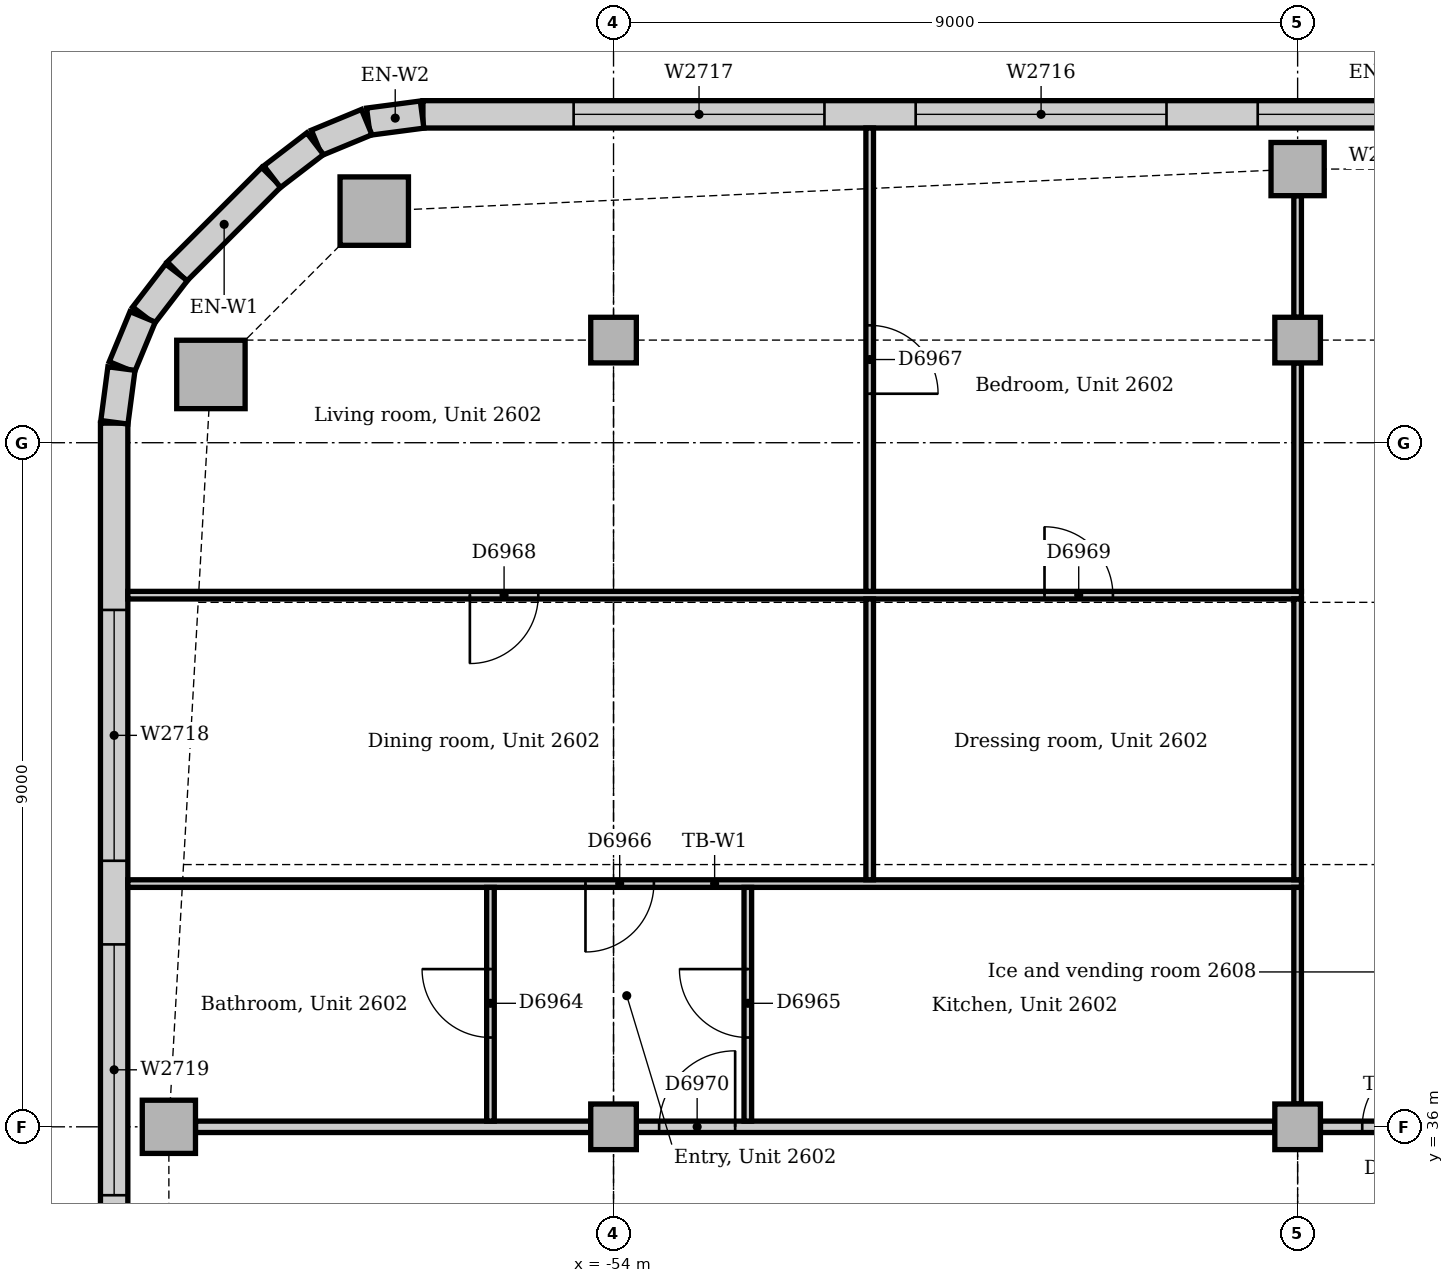
"""IFC4 building model, lengths in metres.
Left out: names, types, materials, properties, quantities, classifications, styles, units other than length and angle.
Written with IfcOpenShell. Run it as: python <this file> out.ifc"""

import sys

from ifc_helpers import new_model, si_unit, direction, frame, frame_2d, origin, origin_2d, place, context, subcontext, project, spatial, rectangle, extrude, element, fill, save


model = new_model("IFC4")
c1 = context("Model", 3, precision=1e-05, world=origin(), true_north=direction((0.0, 1.0)))
c2 = subcontext(c1, "Body", "Model", "MODEL_VIEW")
j1 = project(units=[si_unit("LENGTHUNIT", "METRE"), si_unit("PLANEANGLEUNIT", "RADIAN")], contexts=[c1])
p1 = place(None, origin())
s1 = spatial("IfcSite", under=j1, at=p1, CompositionType="ELEMENT")
p2 = place(p1, origin())
s2 = spatial("IfcBuilding", under=s1, at=p2, CompositionType="ELEMENT")
p3 = place(p2, frame((0.0, 0.0, 112.0)))
s3 = spatial("IfcBuildingStorey", under=s2, at=p3, CompositionType="ELEMENT", Elevation=112.0)
for number, where, z_axis, x_axis in (
    (1, (-57.148, 48.047, 0.0), (0.0, 0.0, 1.0), (1.0, 0.0, 0.0)),
    (2, (-59.297, 45.898, 0.0), (0.0, 0.0, 1.0), (1.0, 0.0, 0.0)),
):
    element("IfcColumn", number, at=place(p3, frame(where, z_axis=z_axis, x_axis=x_axis)), inside=s3, PredefinedType="COLUMN", context=c2, shape_type="SweptSolid", body=[
        extrude(rectangle(XDim=0.9, YDim=0.9, at=origin_2d()), origin(), (0.0, 0.0, 1.0), 3.85),
    ])
for number, where, z_axis, x_axis in (
    (3, (-45.0, 48.6, 0.0), (0.0, 0.0, 1.0), (1.0, 0.0, 0.0)),
    (4, (-59.85, 36.0, 0.0), (0.0, 0.0, 1.0), (1.0, 0.0, 0.0)),
):
    element("IfcColumn", number, at=place(p3, frame(where, z_axis=z_axis, x_axis=x_axis)), inside=s3, PredefinedType="COLUMN", context=c2, shape_type="SweptSolid", body=[
        extrude(rectangle(XDim=0.7, YDim=0.7, at=origin_2d()), origin(), (0.0, 0.0, 1.0), 3.85),
    ])
for number, where, z_axis, x_axis in (
    (5, (-54.0, 36.0, 0.0), (0.0, 0.0, 1.0), (1.0, 0.0, 0.0)),
    (6, (-54.0, 46.35, 0.0), (0.0, 0.0, 1.0), (1.0, 0.0, 0.0)),
    (7, (-45.0, 36.0, 0.0), (0.0, 0.0, 1.0), (1.0, 0.0, 0.0)),
    (8, (-45.0, 46.35, 0.0), (0.0, 0.0, 1.0), (1.0, 0.0, 0.0)),
):
    element("IfcColumn", number, at=place(p3, frame(where, z_axis=z_axis, x_axis=x_axis)), inside=s3, PredefinedType="COLUMN", context=c2, shape_type="SweptSolid", body=[
        extrude(rectangle(XDim=0.6, YDim=0.6, at=origin_2d()), origin(), (0.0, 0.0, 1.0), 3.85),
    ])
p4 = place(p3, frame((-31.243, 49.32, 0.0), z_axis=(0.0, 0.0, 1.0), x_axis=(-1.0, 0.0, 0.0)))
e9 = element("IfcWall", 9, at=p4, inside=s3, PredefinedType="STANDARD", context=c2, shape_type="SweptSolid", body=[
    extrude(rectangle(XDim=25.265, YDim=0.36, at=frame_2d((12.632, 0.0))), origin(), (0.0, 0.0, 1.0), 3.85),
])
p5 = place(p4, frame((1.982, 0.0, 0.9)))
e10 = element("IfcOpeningElement", 10, at=p5, cuts=e9, PredefinedType="OPENING", context=c2, shape_type="SweptSolid", body=[
    extrude(rectangle(XDim=3.3, YDim=1.6, at=frame_2d((1.65, 0.8))), frame((0.0, 0.19, 0.0), z_axis=(0.0, -1.0, 0.0), x_axis=(1.0, 0.0, 0.0)), (0.0, 0.0, 1.0), 0.38),
])
p6 = place(p4, frame((6.482, 0.0, 0.9)))
e11 = element("IfcOpeningElement", 11, at=p6, cuts=e9, PredefinedType="OPENING", context=c2, shape_type="SweptSolid", body=[
    extrude(rectangle(XDim=3.3, YDim=1.6, at=frame_2d((1.65, 0.8))), frame((0.0, 0.19, 0.0), z_axis=(0.0, -1.0, 0.0), x_axis=(1.0, 0.0, 0.0)), (0.0, 0.0, 1.0), 0.38),
])
p7 = place(p4, frame((10.982, 0.0, 0.9)))
e12 = element("IfcOpeningElement", 12, at=p7, cuts=e9, PredefinedType="OPENING", context=c2, shape_type="SweptSolid", body=[
    extrude(rectangle(XDim=3.3, YDim=1.6, at=frame_2d((1.65, 0.8))), frame((0.0, 0.19, 0.0), z_axis=(0.0, -1.0, 0.0), x_axis=(1.0, 0.0, 0.0)), (0.0, 0.0, 1.0), 0.38),
])
p8 = place(p4, frame((15.482, 0.0, 0.9)))
e13 = element("IfcOpeningElement", 13, at=p8, cuts=e9, PredefinedType="OPENING", context=c2, shape_type="SweptSolid", body=[
    extrude(rectangle(XDim=3.3, YDim=1.6, at=frame_2d((1.65, 0.8))), frame((0.0, 0.19, 0.0), z_axis=(0.0, -1.0, 0.0), x_axis=(1.0, 0.0, 0.0)), (0.0, 0.0, 1.0), 0.38),
])
p9 = place(p4, frame((19.982, 0.0, 0.9)))
e14 = element("IfcOpeningElement", 14, at=p9, cuts=e9, PredefinedType="OPENING", context=c2, shape_type="SweptSolid", body=[
    extrude(rectangle(XDim=3.3, YDim=1.6, at=frame_2d((1.65, 0.8))), frame((0.0, 0.19, 0.0), z_axis=(0.0, -1.0, 0.0), x_axis=(1.0, 0.0, 0.0)), (0.0, 0.0, 1.0), 0.38),
])
p10 = place(p3, frame((-58.501, 48.494, 0.0), z_axis=(0.0, 0.0, 1.0), x_axis=(-0.707106781187, -0.707106781187, 0.0)))
e15 = element("IfcWall", 15, at=p10, inside=s3, PredefinedType="STANDARD", context=c2, shape_type="SweptSolid", body=[
    extrude(rectangle(XDim=1.757, YDim=0.36, at=frame_2d((0.879, 0.0))), origin(), (0.0, 0.0, 1.0), 3.85),
])
p11 = place(p3, frame((-60.57, 45.257, 0.0), z_axis=(0.0, 0.0, 1.0), x_axis=(0.0, -1.0, 0.0)))
e16 = element("IfcWall", 16, at=p11, inside=s3, PredefinedType="STANDARD", context=c2, shape_type="SweptSolid", body=[
    extrude(rectangle(XDim=21.515, YDim=0.36, at=frame_2d((10.757, 0.0))), origin(), (0.0, 0.0, 1.0), 3.85),
])
p12 = place(p11, frame((2.457, 0.0, 0.9)))
e17 = element("IfcOpeningElement", 17, at=p12, cuts=e16, PredefinedType="OPENING", context=c2, shape_type="SweptSolid", body=[
    extrude(rectangle(XDim=3.3, YDim=1.6, at=frame_2d((1.65, 0.8))), frame((0.0, 0.19, 0.0), z_axis=(0.0, -1.0, 0.0), x_axis=(1.0, 0.0, 0.0)), (0.0, 0.0, 1.0), 0.38),
])
p13 = place(p11, frame((6.857, 0.0, 0.9)))
e18 = element("IfcOpeningElement", 18, at=p13, cuts=e16, PredefinedType="OPENING", context=c2, shape_type="SweptSolid", body=[
    extrude(rectangle(XDim=3.3, YDim=1.6, at=frame_2d((1.65, 0.8))), frame((0.0, 0.19, 0.0), z_axis=(0.0, -1.0, 0.0), x_axis=(1.0, 0.0, 0.0)), (0.0, 0.0, 1.0), 0.38),
])
p14 = place(p11, frame((11.357, 0.0, 0.9)))
e19 = element("IfcOpeningElement", 19, at=p14, cuts=e16, PredefinedType="OPENING", context=c2, shape_type="SweptSolid", body=[
    extrude(rectangle(XDim=3.3, YDim=1.6, at=frame_2d((1.65, 0.8))), frame((0.0, 0.19, 0.0), z_axis=(0.0, -1.0, 0.0), x_axis=(1.0, 0.0, 0.0)), (0.0, 0.0, 1.0), 0.38),
])
p15 = place(p11, frame((15.857, 0.0, 0.9)))
e20 = element("IfcOpeningElement", 20, at=p15, cuts=e16, PredefinedType="OPENING", context=c2, shape_type="SweptSolid", body=[
    extrude(rectangle(XDim=3.3, YDim=1.6, at=frame_2d((1.65, 0.8))), frame((0.0, 0.19, 0.0), z_axis=(0.0, -1.0, 0.0), x_axis=(1.0, 0.0, 0.0)), (0.0, 0.0, 1.0), 0.38),
])
for number, where, z_axis, x_axis in (
    (21, (-56.519, 49.317, 0.0), (0.0, 0.0, 1.0), (-0.991, -0.131, 0.0)),
    (22, (-57.247, 49.218, 0.0), (0.0, 0.0, 1.0), (-0.924, -0.383, 0.0)),
):
    element("IfcWall", number, at=place(p3, frame(where, z_axis=z_axis, x_axis=x_axis)), inside=s3, PredefinedType="STANDARD", context=c2, shape_type="SweptSolid", body=[
        extrude(rectangle(XDim=0.713, YDim=0.36, at=frame_2d((0.356, 0.0))), origin(), (0.0, 0.0, 1.0), 3.85),
    ])
for number, where, z_axis, x_axis in (
    (23, (-57.925, 48.934, 0.0), (0.0, 0.0, 1.0), (-0.793, -0.609, 0.0)),
    (24, (-59.75, 47.241, 0.0), (0.0, 0.0, 1.0), (-0.609, -0.793, 0.0)),
):
    element("IfcWall", number, at=place(p3, frame(where, z_axis=z_axis, x_axis=x_axis)), inside=s3, PredefinedType="STANDARD", context=c2, shape_type="SweptSolid", body=[
        extrude(rectangle(XDim=0.713, YDim=0.36, at=frame_2d((0.357, 0.0))), origin(), (0.0, 0.0, 1.0), 3.85),
    ])
for number, where, z_axis, x_axis in (
    (25, (-60.195, 46.656, 0.0), (0.0, 0.0, 1.0), (-0.383, -0.924, 0.0)),
    (26, (-60.474, 45.976, 0.0), (0.0, 0.0, 1.0), (-0.131, -0.991, 0.0)),
):
    element("IfcWall", number, at=place(p3, frame(where, z_axis=z_axis, x_axis=x_axis)), inside=s3, PredefinedType="STANDARD", context=c2, shape_type="SweptSolid", body=[
        extrude(rectangle(XDim=0.713, YDim=0.36, at=frame_2d((0.356, 0.0))), origin(), (0.0, 0.0, 1.0), 3.85),
    ])
p16 = place(p3, frame((-44.7, 36.0, 0.0), z_axis=(0.0, 0.0, 1.0), x_axis=(1.0, 0.0, 0.0)))
e27 = element("IfcWall", 27, at=p16, inside=s3, PredefinedType="PARTITIONING", context=c2, shape_type="SweptSolid", body=[
    extrude(rectangle(XDim=1.975, YDim=0.15, at=frame_2d((0.988, 0.0))), origin(), (0.0, 0.0, 1.0), 3.602),
])
p17 = place(p16, frame((0.55, 0.0, 0.0)))
e28 = element("IfcOpeningElement", 28, at=p17, cuts=e27, PredefinedType="OPENING", context=c2, shape_type="SweptSolid", body=[
    extrude(rectangle(XDim=0.9, YDim=2.1, at=frame_2d((0.45, 1.05))), frame((0.0, 0.085, 0.0), z_axis=(0.0, -1.0, 0.0), x_axis=(1.0, 0.0, 0.0)), (0.0, 0.0, 1.0), 0.17),
])
p18 = place(p3, frame((-53.7, 36.0, 0.0), z_axis=(0.0, 0.0, 1.0), x_axis=(1.0, 0.0, 0.0)))
e29 = element("IfcWall", 29, at=p18, inside=s3, PredefinedType="PARTITIONING", context=c2, shape_type="SweptSolid", body=[
    extrude(rectangle(XDim=8.4, YDim=0.15, at=frame_2d((4.2, 0.0))), origin(), (0.0, 0.0, 1.0), 3.262),
])
p19 = place(p18, frame((0.3, 0.0, 0.0)))
e30 = element("IfcOpeningElement", 30, at=p19, cuts=e29, PredefinedType="OPENING", context=c2, shape_type="SweptSolid", body=[
    extrude(rectangle(XDim=1.0, YDim=2.1, at=frame_2d((0.5, 1.05))), frame((0.0, 0.085, 0.0), z_axis=(0.0, -1.0, 0.0), x_axis=(1.0, 0.0, 0.0)), (0.0, 0.0, 1.0), 0.17),
])
p20 = place(p3, frame((-59.5, 36.0, 0.0), z_axis=(0.0, 0.0, 1.0), x_axis=(1.0, 0.0, 0.0)))
e31 = element("IfcWall", 31, at=p20, inside=s3, PredefinedType="PARTITIONING", context=c2, shape_type="SweptSolid", body=[
    extrude(rectangle(XDim=5.2, YDim=0.15, at=frame_2d((2.6, 0.0))), origin(), (0.0, 0.0, 1.0), 3.35),
])
p21 = place(p3, frame((-60.39, 39.2, 0.0), z_axis=(0.0, 0.0, 1.0), x_axis=(1.0, 0.0, 0.0)))
e32 = element("IfcWall", 32, at=p21, inside=s3, PredefinedType="PARTITIONING", context=c2, shape_type="SweptSolid", body=[
    extrude(rectangle(XDim=15.44, YDim=0.1, at=frame_2d((7.72, 0.0))), origin(), (0.0, 0.0, 1.0), 3.85),
])
p22 = place(p21, frame((6.021, 0.0, 0.0)))
e33 = element("IfcOpeningElement", 33, at=p22, cuts=e32, PredefinedType="OPENING", context=c2, shape_type="SweptSolid", body=[
    extrude(rectangle(XDim=0.9, YDim=2.1, at=frame_2d((0.45, 1.05))), frame((0.0, 0.06, 0.0), z_axis=(0.0, -1.0, 0.0), x_axis=(1.0, 0.0, 0.0)), (0.0, 0.0, 1.0), 0.12),
])
p23 = place(p3, frame((-60.39, 42.994, 0.0), z_axis=(0.0, 0.0, 1.0), x_axis=(1.0, 0.0, 0.0)))
e34 = element("IfcWall", 34, at=p23, inside=s3, PredefinedType="PARTITIONING", context=c2, shape_type="SweptSolid", body=[
    extrude(rectangle(XDim=15.44, YDim=0.1, at=frame_2d((7.72, 0.0))), origin(), (0.0, 0.0, 1.0), 3.4),
])
p24 = place(p23, frame((4.5, 0.0, 0.0)))
e35 = element("IfcOpeningElement", 35, at=p24, cuts=e34, PredefinedType="OPENING", context=c2, shape_type="SweptSolid", body=[
    extrude(rectangle(XDim=0.9, YDim=2.1, at=frame_2d((0.45, 1.05))), frame((0.0, 0.06, 0.0), z_axis=(0.0, -1.0, 0.0), x_axis=(1.0, 0.0, 0.0)), (0.0, 0.0, 1.0), 0.12),
])
p25 = place(p23, frame((12.06, 0.0, 0.0)))
e36 = element("IfcOpeningElement", 36, at=p25, cuts=e34, PredefinedType="OPENING", context=c2, shape_type="SweptSolid", body=[
    extrude(rectangle(XDim=0.9, YDim=2.1, at=frame_2d((0.45, 1.05))), frame((0.0, 0.06, 0.0), z_axis=(0.0, -1.0, 0.0), x_axis=(1.0, 0.0, 0.0)), (0.0, 0.0, 1.0), 0.12),
])
p26 = place(p3, frame((-45.0, 43.044, 0.0), z_axis=(0.0, 0.0, 1.0), x_axis=(0.0, 1.0, 0.0)))
e37 = element("IfcWall", 37, at=p26, inside=s3, PredefinedType="PARTITIONING", context=c2, shape_type="SweptSolid", body=[
    extrude(rectangle(XDim=3.006, YDim=0.1, at=frame_2d((1.503, 0.0))), origin(), (0.0, 0.0, 1.0), 3.362),
])
p27 = place(p3, frame((-45.0, 39.25, 0.0), z_axis=(0.0, 0.0, 1.0), x_axis=(0.0, 1.0, 0.0)))
e38 = element("IfcWall", 38, at=p27, inside=s3, PredefinedType="PARTITIONING", context=c2, shape_type="SweptSolid", body=[
    extrude(rectangle(XDim=3.694, YDim=0.1, at=frame_2d((1.847, 0.0))), origin(), (0.0, 0.0, 1.0), 3.362),
])
p28 = place(p3, frame((-45.0, 36.3, 0.0), z_axis=(0.0, 0.0, 1.0), x_axis=(0.0, 1.0, 0.0)))
e39 = element("IfcWall", 39, at=p28, inside=s3, PredefinedType="PARTITIONING", context=c2, shape_type="SweptSolid", body=[
    extrude(rectangle(XDim=2.85, YDim=0.1, at=frame_2d((1.425, 0.0))), origin(), (0.0, 0.0, 1.0), 3.362),
])
p29 = place(p3, frame((-45.0, 46.65, 0.0), z_axis=(0.0, 0.0, 1.0), x_axis=(0.0, 1.0, 0.0)))
e40 = element("IfcWall", 40, at=p29, inside=s3, PredefinedType="PARTITIONING", context=c2, shape_type="SweptSolid", body=[
    extrude(rectangle(XDim=1.6, YDim=0.1, at=frame_2d((0.8, 0.0))), origin(), (0.0, 0.0, 1.0), 3.652),
])
p30 = place(p3, frame((-50.63, 39.25, 0.0), z_axis=(0.0, 0.0, 1.0), x_axis=(0.0, 1.0, 0.0)))
e41 = element("IfcWall", 41, at=p30, inside=s3, PredefinedType="PARTITIONING", context=c2, shape_type="SweptSolid", body=[
    extrude(rectangle(XDim=3.694, YDim=0.1, at=frame_2d((1.847, 0.0))), origin(), (0.0, 0.0, 1.0), 3.85),
])
p31 = place(p3, frame((-50.63, 43.044, 0.0), z_axis=(0.0, 0.0, 1.0), x_axis=(0.0, 1.0, 0.0)))
e42 = element("IfcWall", 42, at=p31, inside=s3, PredefinedType="PARTITIONING", context=c2, shape_type="SweptSolid", body=[
    extrude(rectangle(XDim=6.096, YDim=0.1, at=frame_2d((3.048, 0.0))), origin(), (0.0, 0.0, 1.0), 3.85),
])
p32 = place(p31, frame((2.6, 0.0, 0.0)))
e43 = element("IfcOpeningElement", 43, at=p32, cuts=e42, PredefinedType="OPENING", context=c2, shape_type="SweptSolid", body=[
    extrude(rectangle(XDim=0.9, YDim=2.1, at=frame_2d((0.45, 1.05))), frame((0.0, 0.06, 0.0), z_axis=(0.0, -1.0, 0.0), x_axis=(1.0, 0.0, 0.0)), (0.0, 0.0, 1.0), 0.12),
])
p33 = place(p3, frame((-55.619, 36.075, 0.0), z_axis=(0.0, 0.0, 1.0), x_axis=(0.0, 1.0, 0.0)))
e44 = element("IfcWall", 44, at=p33, inside=s3, PredefinedType="PARTITIONING", context=c2, shape_type="SweptSolid", body=[
    extrude(rectangle(XDim=3.075, YDim=0.1, at=frame_2d((1.538, 0.0))), origin(), (0.0, 0.0, 1.0), 3.85),
])
p34 = place(p33, frame((1.1, 0.0, 0.0)))
e45 = element("IfcOpeningElement", 45, at=p34, cuts=e44, PredefinedType="OPENING", context=c2, shape_type="SweptSolid", body=[
    extrude(rectangle(XDim=0.9, YDim=2.1, at=frame_2d((0.45, 1.05))), frame((0.0, 0.06, 0.0), z_axis=(0.0, -1.0, 0.0), x_axis=(1.0, 0.0, 0.0)), (0.0, 0.0, 1.0), 0.12),
])
p35 = place(p3, frame((-52.233, 36.075, 0.0), z_axis=(0.0, 0.0, 1.0), x_axis=(0.0, 1.0, 0.0)))
e46 = element("IfcWall", 46, at=p35, inside=s3, PredefinedType="PARTITIONING", context=c2, shape_type="SweptSolid", body=[
    extrude(rectangle(XDim=3.075, YDim=0.1, at=frame_2d((1.538, 0.0))), origin(), (0.0, 0.0, 1.0), 3.85),
])
p36 = place(p35, frame((1.1, 0.0, 0.0)))
e47 = element("IfcOpeningElement", 47, at=p36, cuts=e46, PredefinedType="OPENING", context=c2, shape_type="SweptSolid", body=[
    extrude(rectangle(XDim=0.9, YDim=2.1, at=frame_2d((0.45, 1.05))), frame((0.0, 0.06, 0.0), z_axis=(0.0, -1.0, 0.0), x_axis=(1.0, 0.0, 0.0)), (0.0, 0.0, 1.0), 0.12),
])
p37 = place(p7, origin())
e48 = element("IfcWindow", 48, at=p37, inside=s3, PartitioningType="SINGLE_PANEL", PredefinedType="WINDOW", context=c2, shape_type="SweptSolid", body=[
    extrude(rectangle(XDim=3.3, YDim=1.6, at=frame_2d((1.65, 0.8))), frame((0.0, 0.13, 0.0), z_axis=(0.0, -1.0, 0.0), x_axis=(1.0, 0.0, 0.0)), (0.0, 0.0, 1.0), 0.06),
])
fill(e12, e48)
p38 = place(p8, origin())
e49 = element("IfcWindow", 49, at=p38, inside=s3, PartitioningType="SINGLE_PANEL", PredefinedType="WINDOW", context=c2, shape_type="SweptSolid", body=[
    extrude(rectangle(XDim=3.3, YDim=1.6, at=frame_2d((1.65, 0.8))), frame((0.0, 0.13, 0.0), z_axis=(0.0, -1.0, 0.0), x_axis=(1.0, 0.0, 0.0)), (0.0, 0.0, 1.0), 0.06),
])
fill(e13, e49)
p39 = place(p9, origin())
e50 = element("IfcWindow", 50, at=p39, inside=s3, PartitioningType="SINGLE_PANEL", PredefinedType="WINDOW", context=c2, shape_type="SweptSolid", body=[
    extrude(rectangle(XDim=3.3, YDim=1.6, at=frame_2d((1.65, 0.8))), frame((0.0, 0.13, 0.0), z_axis=(0.0, -1.0, 0.0), x_axis=(1.0, 0.0, 0.0)), (0.0, 0.0, 1.0), 0.06),
])
fill(e14, e50)
p40 = place(p12, origin())
e51 = element("IfcWindow", 51, at=p40, inside=s3, PartitioningType="SINGLE_PANEL", PredefinedType="WINDOW", context=c2, shape_type="SweptSolid", body=[
    extrude(rectangle(XDim=3.3, YDim=1.6, at=frame_2d((1.65, 0.8))), frame((0.0, 0.13, 0.0), z_axis=(0.0, -1.0, 0.0), x_axis=(1.0, 0.0, 0.0)), (0.0, 0.0, 1.0), 0.06),
])
fill(e17, e51)
p41 = place(p13, origin())
e52 = element("IfcWindow", 52, at=p41, inside=s3, PartitioningType="SINGLE_PANEL", PredefinedType="WINDOW", context=c2, shape_type="SweptSolid", body=[
    extrude(rectangle(XDim=3.3, YDim=1.6, at=frame_2d((1.65, 0.8))), frame((0.0, 0.13, 0.0), z_axis=(0.0, -1.0, 0.0), x_axis=(1.0, 0.0, 0.0)), (0.0, 0.0, 1.0), 0.06),
])
fill(e18, e52)
p42 = place(p17, origin())
e53 = element("IfcDoor", 53, at=p42, inside=s3, OperationType="SINGLE_SWING_RIGHT", PredefinedType="DOOR", context=c2, shape_type="SweptSolid", body=[
    extrude(rectangle(XDim=0.9, YDim=2.1, at=frame_2d((0.45, 1.05))), frame((0.0, 0.025, 0.0), z_axis=(0.0, -1.0, 0.0), x_axis=(1.0, 0.0, 0.0)), (0.0, 0.0, 1.0), 0.05),
])
fill(e28, e53)
p43 = place(p34, origin())
e54 = element("IfcDoor", 54, at=p43, inside=s3, OperationType="SINGLE_SWING_RIGHT", PredefinedType="DOOR", context=c2, shape_type="SweptSolid", body=[
    extrude(rectangle(XDim=0.9, YDim=2.1, at=frame_2d((0.45, 1.05))), frame((0.0, 0.025, 0.0), z_axis=(0.0, -1.0, 0.0), x_axis=(1.0, 0.0, 0.0)), (0.0, 0.0, 1.0), 0.05),
])
fill(e45, e54)
p44 = place(p36, origin())
e55 = element("IfcDoor", 55, at=p44, inside=s3, OperationType="SINGLE_SWING_RIGHT", PredefinedType="DOOR", context=c2, shape_type="SweptSolid", body=[
    extrude(rectangle(XDim=0.9, YDim=2.1, at=frame_2d((0.45, 1.05))), frame((0.0, 0.025, 0.0), z_axis=(0.0, -1.0, 0.0), x_axis=(1.0, 0.0, 0.0)), (0.0, 0.0, 1.0), 0.05),
])
fill(e47, e55)
p45 = place(p22, frame((0.9, 0.0, 0.0), z_axis=(0.0, 0.0, 1.0), x_axis=(-1.0, 0.0, 0.0)))
e56 = element("IfcDoor", 56, at=p45, inside=s3, OperationType="SINGLE_SWING_RIGHT", PredefinedType="DOOR", context=c2, shape_type="SweptSolid", body=[
    extrude(rectangle(XDim=0.9, YDim=2.1, at=frame_2d((0.45, 1.05))), frame((0.0, 0.025, 0.0), z_axis=(0.0, -1.0, 0.0), x_axis=(1.0, 0.0, 0.0)), (0.0, 0.0, 1.0), 0.05),
])
fill(e33, e56)
p46 = place(p32, frame((0.9, 0.0, 0.0), z_axis=(0.0, 0.0, 1.0), x_axis=(-1.0, 0.0, 0.0)))
e57 = element("IfcDoor", 57, at=p46, inside=s3, OperationType="SINGLE_SWING_RIGHT", PredefinedType="DOOR", context=c2, shape_type="SweptSolid", body=[
    extrude(rectangle(XDim=0.9, YDim=2.1, at=frame_2d((0.45, 1.05))), frame((0.0, 0.025, 0.0), z_axis=(0.0, -1.0, 0.0), x_axis=(1.0, 0.0, 0.0)), (0.0, 0.0, 1.0), 0.05),
])
fill(e43, e57)
p47 = place(p24, frame((0.9, 0.0, 0.0), z_axis=(0.0, 0.0, 1.0), x_axis=(-1.0, 0.0, 0.0)))
e58 = element("IfcDoor", 58, at=p47, inside=s3, OperationType="SINGLE_SWING_RIGHT", PredefinedType="DOOR", context=c2, shape_type="SweptSolid", body=[
    extrude(rectangle(XDim=0.9, YDim=2.1, at=frame_2d((0.45, 1.05))), frame((0.0, 0.025, 0.0), z_axis=(0.0, -1.0, 0.0), x_axis=(1.0, 0.0, 0.0)), (0.0, 0.0, 1.0), 0.05),
])
fill(e35, e58)
p48 = place(p25, origin())
e59 = element("IfcDoor", 59, at=p48, inside=s3, OperationType="SINGLE_SWING_LEFT", PredefinedType="DOOR", context=c2, shape_type="SweptSolid", body=[
    extrude(rectangle(XDim=0.9, YDim=2.1, at=frame_2d((0.45, 1.05))), frame((0.0, 0.025, 0.0), z_axis=(0.0, -1.0, 0.0), x_axis=(1.0, 0.0, 0.0)), (0.0, 0.0, 1.0), 0.05),
])
fill(e36, e59)
p49 = place(p19, origin())
e60 = element("IfcDoor", 60, at=p49, inside=s3, OperationType="SINGLE_SWING_RIGHT", PredefinedType="DOOR", context=c2, shape_type="SweptSolid", body=[
    extrude(rectangle(XDim=1.0, YDim=2.1, at=frame_2d((0.5, 1.05))), frame((0.0, 0.025, 0.0), z_axis=(0.0, -1.0, 0.0), x_axis=(1.0, 0.0, 0.0)), (0.0, 0.0, 1.0), 0.05),
])
fill(e30, e60)
save(model, sys.argv[1])
